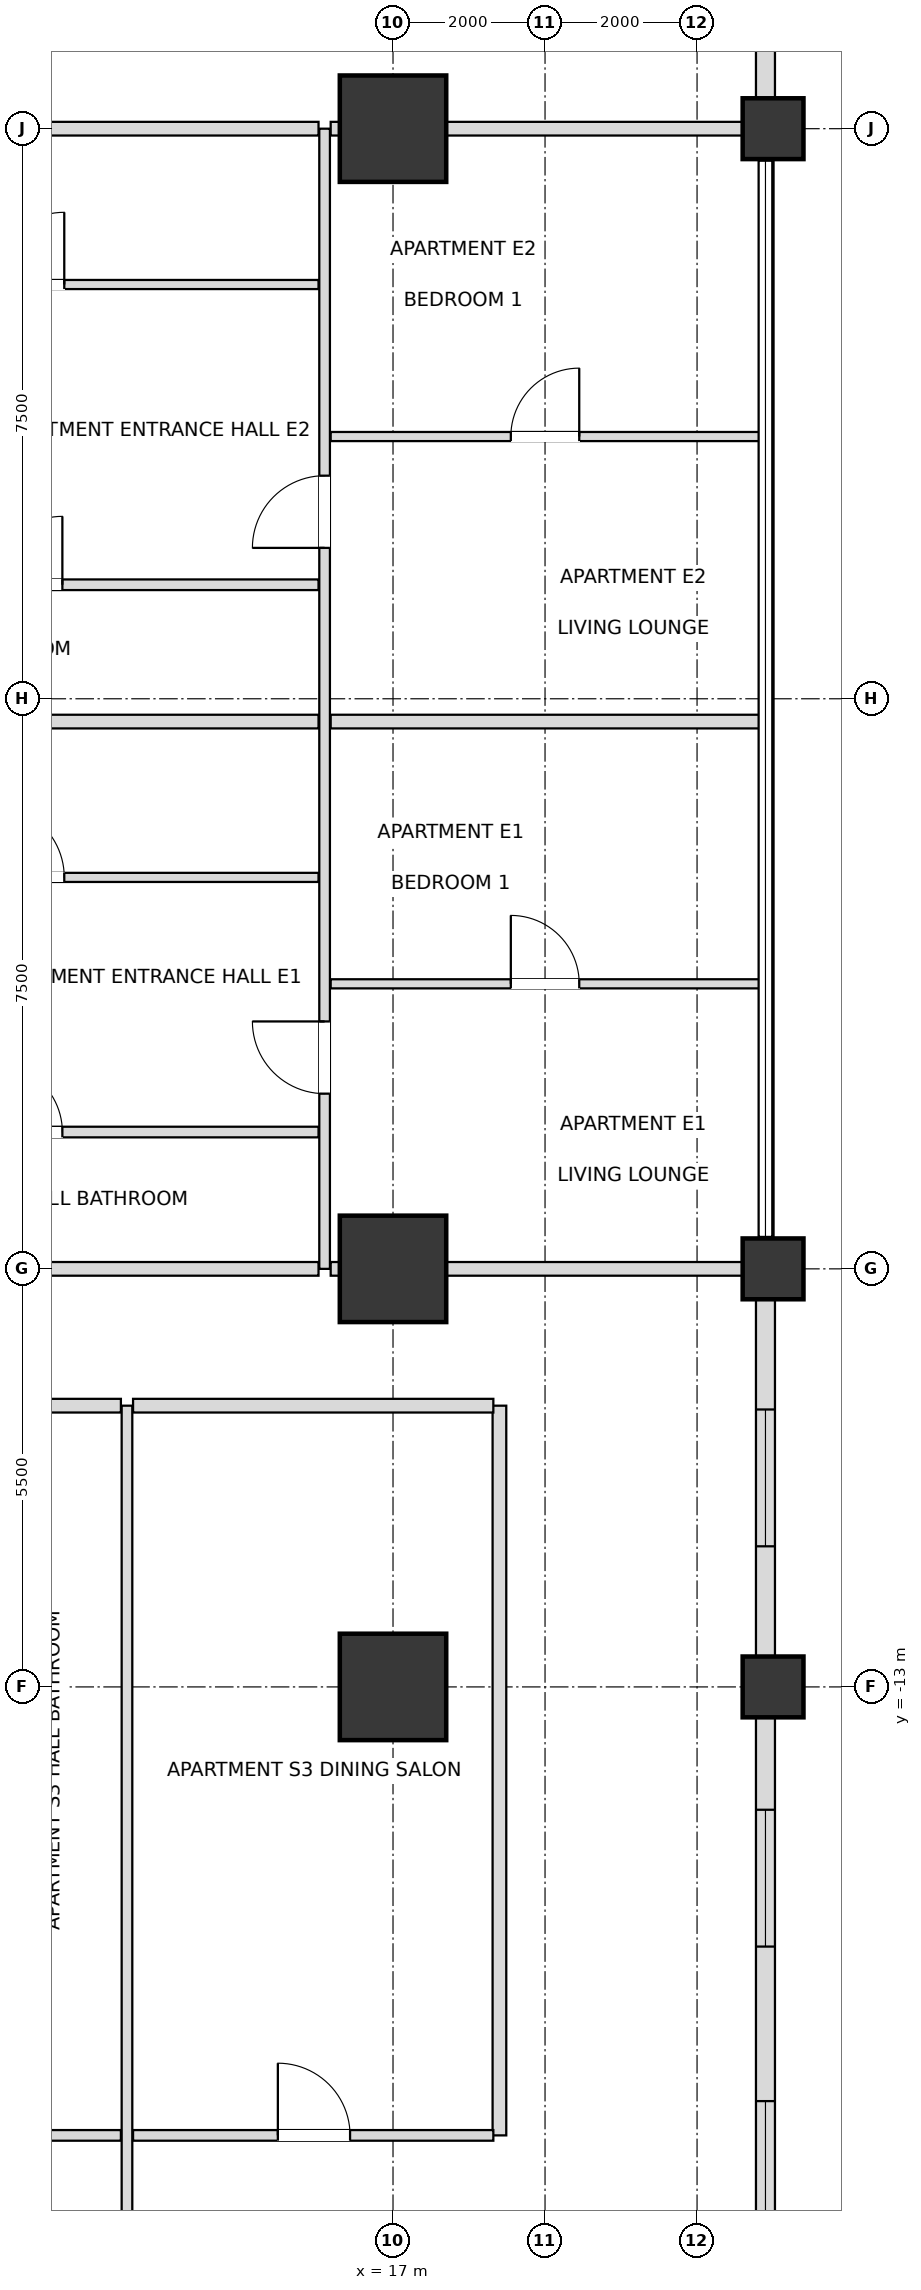
"""IFC4 building model, lengths in metres.
Left out: names, types, materials, properties, quantities, classifications, styles, units other than length and angle.
Written with IfcOpenShell. Run it as: python <this file> out.ifc"""

import sys

from ifc_helpers import new_model, si_unit, direction, frame, frame_2d, origin, origin_2d, place, context, subcontext, project, spatial, rectangle, extrude, element, fill, save


model = new_model("IFC4")
c1 = context("Model", 3, precision=1e-05, world=origin(), true_north=direction((0.0, 1.0)))
c2 = subcontext(c1, "Body", "Model", "MODEL_VIEW")
j1 = project(units=[si_unit("LENGTHUNIT", "METRE"), si_unit("PLANEANGLEUNIT", "RADIAN")], contexts=[c1])
p1 = place(None, origin())
s1 = spatial("IfcSite", under=j1, at=p1, CompositionType="ELEMENT")
p2 = place(p1, origin())
s2 = spatial("IfcBuilding", under=s1, at=p2, CompositionType="ELEMENT")
p3 = place(p2, frame((0.0, 0.0, 32.4)))
s3 = spatial("IfcBuildingStorey", under=s2, at=p3, CompositionType="ELEMENT", Elevation=32.4)
for number, where, z_axis, x_axis in (
    (1, (17.0, -13.0, 0.0), (0.0, 0.0, 1.0), (1.0, 0.0, 0.0)),
    (2, (17.0, -7.5, 0.0), (0.0, 0.0, 1.0), (1.0, 0.0, 0.0)),
    (3, (17.0, 7.5, 0.0), (0.0, 0.0, 1.0), (1.0, 0.0, 0.0)),
):
    element("IfcColumn", number, at=place(p3, frame(where, z_axis=z_axis, x_axis=x_axis)), inside=s3, PredefinedType="USERDEFINED", context=c2, shape_type="SweptSolid", body=[
        extrude(rectangle(XDim=1.4, YDim=1.4, at=origin_2d()), origin(), (0.0, 0.0, 1.0), 3.6),
    ])
for number, where, z_axis, x_axis in (
    (4, (22.0, -13.0, 0.0), (0.0, 0.0, 1.0), (1.0, 0.0, 0.0)),
    (5, (22.0, -7.5, 0.0), (0.0, 0.0, 1.0), (1.0, 0.0, 0.0)),
    (6, (22.0, 7.5, 0.0), (0.0, 0.0, 1.0), (1.0, 0.0, 0.0)),
):
    element("IfcColumn", number, at=place(p3, frame(where, z_axis=z_axis, x_axis=x_axis)), inside=s3, PredefinedType="COLUMN", context=c2, shape_type="SweptSolid", body=[
        extrude(rectangle(XDim=0.8, YDim=0.8, at=origin_2d()), origin(), (0.0, 0.0, 1.0), 3.6),
    ])
p4 = place(p3, frame((21.9, -21.425, 0.0), z_axis=(0.0, 0.0, 1.0), x_axis=(0.0, 1.0, 0.0)))
e7 = element("IfcWall", 7, at=p4, inside=s3, PredefinedType="SOLIDWALL", context=c2, shape_type="SweptSolid", body=[
    extrude(rectangle(XDim=8.03, YDim=0.25, at=frame_2d((4.015, 0.0))), origin(), (0.0, 0.0, 1.0), 2.736),
])
p5 = place(p4, frame((1.176, 0.0, 0.72)))
e8 = element("IfcOpeningElement", 8, at=p5, cuts=e7, PredefinedType="OPENING", context=c2, shape_type="SweptSolid", body=[
    extrude(rectangle(XDim=1.8, YDim=1.68, at=frame_2d((0.9, 0.84))), frame((0.0, 0.135, 0.0), z_axis=(0.0, -1.0, 0.0), x_axis=(1.0, 0.0, 0.0)), (0.0, 0.0, 1.0), 0.27),
])
p6 = place(p4, frame((5.009, 0.0, 0.72)))
e9 = element("IfcOpeningElement", 9, at=p6, cuts=e7, PredefinedType="OPENING", context=c2, shape_type="SweptSolid", body=[
    extrude(rectangle(XDim=1.8, YDim=1.68, at=frame_2d((0.9, 0.84))), frame((0.0, 0.135, 0.0), z_axis=(0.0, -1.0, 0.0), x_axis=(1.0, 0.0, 0.0)), (0.0, 0.0, 1.0), 0.27),
])
p7 = place(p3, frame((21.9, -12.605, 0.0), z_axis=(0.0, 0.0, 1.0), x_axis=(0.0, 1.0, 0.0)))
e10 = element("IfcWall", 10, at=p7, inside=s3, PredefinedType="SOLIDWALL", context=c2, shape_type="SweptSolid", body=[
    extrude(rectangle(XDim=4.71, YDim=0.25, at=frame_2d((2.355, 0.0))), origin(), (0.0, 0.0, 1.0), 2.736),
])
p8 = place(p7, frame((1.455, 0.0, 0.72)))
e11 = element("IfcOpeningElement", 11, at=p8, cuts=e10, PredefinedType="OPENING", context=c2, shape_type="SweptSolid", body=[
    extrude(rectangle(XDim=1.8, YDim=1.68, at=frame_2d((0.9, 0.84))), frame((0.0, 0.135, 0.0), z_axis=(0.0, -1.0, 0.0), x_axis=(1.0, 0.0, 0.0)), (0.0, 0.0, 1.0), 0.27),
])
p9 = place(p3, frame((21.9, 7.895, 0.0), z_axis=(0.0, 0.0, 1.0), x_axis=(0.0, 1.0, 0.0)))
e12 = element("IfcWall", 12, at=p9, inside=s3, PredefinedType="SOLIDWALL", context=c2, shape_type="SweptSolid", body=[
    extrude(rectangle(XDim=4.71, YDim=0.25, at=frame_2d((2.355, 0.0))), origin(), (0.0, 0.0, 1.0), 2.736),
])
p10 = place(p9, frame((1.455, 0.0, 0.72)))
e13 = element("IfcOpeningElement", 13, at=p10, cuts=e12, PredefinedType="OPENING", context=c2, shape_type="SweptSolid", body=[
    extrude(rectangle(XDim=1.8, YDim=1.68, at=frame_2d((0.9, 0.84))), frame((0.0, 0.135, 0.0), z_axis=(0.0, -1.0, 0.0), x_axis=(1.0, 0.0, 0.0)), (0.0, 0.0, 1.0), 0.27),
])
p11 = place(p3, frame((13.5, -24.9, 0.0), z_axis=(0.0, 0.0, 1.0), x_axis=(0.0, 1.0, 0.0)))
e14 = element("IfcWall", 14, at=p11, inside=s3, PredefinedType="PARTITIONING", context=c2, shape_type="SweptSolid", body=[
    extrude(rectangle(XDim=15.6, YDim=0.14, at=frame_2d((7.8, 0.0))), origin(), (0.0, 0.0, 1.0), 2.736),
])
p12 = place(p11, frame((2.55, 0.0, 0.0)))
e15 = element("IfcOpeningElement", 15, at=p12, cuts=e14, PredefinedType="OPENING", context=c2, shape_type="SweptSolid", body=[
    extrude(rectangle(XDim=0.9, YDim=2.1, at=frame_2d((0.45, 1.05))), frame((0.0, 0.08, 0.0), z_axis=(0.0, -1.0, 0.0), x_axis=(1.0, 0.0, 0.0)), (0.0, 0.0, 1.0), 0.16),
])
p13 = place(p3, frame((16.1, -7.5, 0.0), z_axis=(0.0, 0.0, 1.0), x_axis=(0.0, 1.0, 0.0)))
e16 = element("IfcWall", 16, at=p13, inside=s3, PredefinedType="PARTITIONING", context=c2, shape_type="SweptSolid", body=[
    extrude(rectangle(XDim=15.0, YDim=0.14, at=frame_2d((7.5, 0.0))), origin(), (0.0, 0.0, 1.0), 3.38),
])
p14 = place(p13, frame((2.305, 0.0, 0.0)))
e17 = element("IfcOpeningElement", 17, at=p14, cuts=e16, PredefinedType="OPENING", context=c2, shape_type="SweptSolid", body=[
    extrude(rectangle(XDim=0.95, YDim=2.1, at=frame_2d((0.475, 1.05))), frame((0.0, 0.08, 0.0), z_axis=(0.0, -1.0, 0.0), x_axis=(1.0, 0.0, 0.0)), (0.0, 0.0, 1.0), 0.16),
])
p15 = place(p13, frame((9.485, 0.0, 0.0)))
e18 = element("IfcOpeningElement", 18, at=p15, cuts=e16, PredefinedType="OPENING", context=c2, shape_type="SweptSolid", body=[
    extrude(rectangle(XDim=0.95, YDim=2.1, at=frame_2d((0.475, 1.05))), frame((0.0, 0.08, 0.0), z_axis=(0.0, -1.0, 0.0), x_axis=(1.0, 0.0, 0.0)), (0.0, 0.0, 1.0), 0.16),
])
p16 = place(p3, frame((18.4, -18.9, 0.0), z_axis=(0.0, 0.0, 1.0), x_axis=(0.0, 1.0, 0.0)))
e19 = element("IfcWall", 19, at=p16, inside=s3, PredefinedType="PARTITIONING", context=c2, shape_type="SweptSolid", body=[
    extrude(rectangle(XDim=9.6, YDim=0.18, at=frame_2d((4.8, 0.0))), origin(), (0.0, 0.0, 1.0), 2.736),
])
p17 = place(p3, frame((11.63, -18.9, 0.0), z_axis=(0.0, 0.0, 1.0), x_axis=(1.0, 0.0, 0.0)))
e20 = element("IfcWall", 20, at=p17, inside=s3, PredefinedType="PARTITIONING", context=c2, shape_type="SweptSolid", body=[
    extrude(rectangle(XDim=1.79, YDim=0.14, at=frame_2d((0.895, 0.0))), origin(), (0.0, 0.0, 1.0), 2.736),
])
p18 = place(p3, frame((13.58, -18.9, 0.0), z_axis=(0.0, 0.0, 1.0), x_axis=(1.0, 0.0, 0.0)))
e21 = element("IfcWall", 21, at=p18, inside=s3, PredefinedType="PARTITIONING", context=c2, shape_type="SweptSolid", body=[
    extrude(rectangle(XDim=4.74, YDim=0.14, at=frame_2d((2.37, 0.0))), origin(), (0.0, 0.0, 1.0), 2.736),
])
p19 = place(p18, frame((1.905, 0.0, 0.0)))
e22 = element("IfcOpeningElement", 22, at=p19, cuts=e21, PredefinedType="OPENING", context=c2, shape_type="SweptSolid", body=[
    extrude(rectangle(XDim=0.95, YDim=2.1, at=frame_2d((0.475, 1.05))), frame((0.0, 0.08, 0.0), z_axis=(0.0, -1.0, 0.0), x_axis=(1.0, 0.0, 0.0)), (0.0, 0.0, 1.0), 0.16),
])
p20 = place(p3, frame((11.63, -9.3, 0.0), z_axis=(0.0, 0.0, 1.0), x_axis=(1.0, 0.0, 0.0)))
e23 = element("IfcWall", 23, at=p20, inside=s3, PredefinedType="PARTITIONING", context=c2, shape_type="SweptSolid", body=[
    extrude(rectangle(XDim=1.79, YDim=0.18, at=frame_2d((0.895, 0.0))), origin(), (0.0, 0.0, 1.0), 3.38),
])
p21 = place(p3, frame((13.58, -9.3, 0.0), z_axis=(0.0, 0.0, 1.0), x_axis=(1.0, 0.0, 0.0)))
e24 = element("IfcWall", 24, at=p21, inside=s3, PredefinedType="PARTITIONING", context=c2, shape_type="SweptSolid", body=[
    extrude(rectangle(XDim=4.74, YDim=0.18, at=frame_2d((2.37, 0.0))), origin(), (0.0, 0.0, 1.0), 2.816),
])
p22 = place(p3, frame((8.38, -7.5, 0.0), z_axis=(0.0, 0.0, 1.0), x_axis=(1.0, 0.0, 0.0)))
e25 = element("IfcWall", 25, at=p22, inside=s3, PredefinedType="PARTITIONING", context=c2, shape_type="SweptSolid", body=[
    extrude(rectangle(XDim=7.64, YDim=0.18, at=frame_2d((3.82, 0.0))), origin(), (0.0, 0.0, 1.0), 2.816),
])
p23 = place(p3, frame((16.18, -7.5, 0.0), z_axis=(0.0, 0.0, 1.0), x_axis=(1.0, 0.0, 0.0)))
e26 = element("IfcWall", 26, at=p23, inside=s3, PredefinedType="PARTITIONING", context=c2, shape_type="SweptSolid", body=[
    extrude(rectangle(XDim=5.72, YDim=0.18, at=frame_2d((2.86, 0.0))), origin(), (0.0, 0.0, 1.0), 2.816),
])
p24 = place(p3, frame((8.38, -5.7, 0.0), z_axis=(0.0, 0.0, 1.0), x_axis=(1.0, 0.0, 0.0)))
e27 = element("IfcWall", 27, at=p24, inside=s3, PredefinedType="PARTITIONING", context=c2, shape_type="SweptSolid", body=[
    extrude(rectangle(XDim=7.64, YDim=0.14, at=frame_2d((3.82, 0.0))), origin(), (0.0, 0.0, 1.0), 2.948),
])
p25 = place(p24, frame((3.37, 0.0, 0.0)))
e28 = element("IfcOpeningElement", 28, at=p25, cuts=e27, PredefinedType="OPENING", context=c2, shape_type="SweptSolid", body=[
    extrude(rectangle(XDim=0.9, YDim=2.1, at=frame_2d((0.45, 1.05))), frame((0.0, 0.08, 0.0), z_axis=(0.0, -1.0, 0.0), x_axis=(1.0, 0.0, 0.0)), (0.0, 0.0, 1.0), 0.16),
])
p26 = place(p3, frame((16.18, -3.75, 0.0), z_axis=(0.0, 0.0, 1.0), x_axis=(1.0, 0.0, 0.0)))
e29 = element("IfcWall", 29, at=p26, inside=s3, PredefinedType="PARTITIONING", context=c2, shape_type="SweptSolid", body=[
    extrude(rectangle(XDim=5.64, YDim=0.12, at=frame_2d((2.82, 0.0))), origin(), (0.0, 0.0, 1.0), 2.816),
])
p27 = place(p26, frame((2.37, 0.0, 0.0)))
e30 = element("IfcOpeningElement", 30, at=p27, cuts=e29, PredefinedType="OPENING", context=c2, shape_type="SweptSolid", body=[
    extrude(rectangle(XDim=0.9, YDim=2.1, at=frame_2d((0.45, 1.05))), frame((0.0, 0.07, 0.0), z_axis=(0.0, -1.0, 0.0), x_axis=(1.0, 0.0, 0.0)), (0.0, 0.0, 1.0), 0.14),
])
p28 = place(p3, frame((8.38, -2.35, 0.0), z_axis=(0.0, 0.0, 1.0), x_axis=(1.0, 0.0, 0.0)))
e31 = element("IfcWall", 31, at=p28, inside=s3, PredefinedType="PARTITIONING", context=c2, shape_type="SweptSolid", body=[
    extrude(rectangle(XDim=7.64, YDim=0.12, at=frame_2d((3.82, 0.0))), origin(), (0.0, 0.0, 1.0), 2.948),
])
p29 = place(p28, frame((3.345, 0.0, 0.0)))
e32 = element("IfcOpeningElement", 32, at=p29, cuts=e31, PredefinedType="OPENING", context=c2, shape_type="SweptSolid", body=[
    extrude(rectangle(XDim=0.95, YDim=2.1, at=frame_2d((0.475, 1.05))), frame((0.0, 0.07, 0.0), z_axis=(0.0, -1.0, 0.0), x_axis=(1.0, 0.0, 0.0)), (0.0, 0.0, 1.0), 0.14),
])
p30 = place(p3, frame((8.38, -0.3, 0.0), z_axis=(0.0, 0.0, 1.0), x_axis=(1.0, 0.0, 0.0)))
e33 = element("IfcWall", 33, at=p30, inside=s3, PredefinedType="PARTITIONING", context=c2, shape_type="SweptSolid", body=[
    extrude(rectangle(XDim=7.64, YDim=0.18, at=frame_2d((3.82, 0.0))), origin(), (0.0, 0.0, 1.0), 2.948),
])
p31 = place(p3, frame((16.18, -0.3, 0.0), z_axis=(0.0, 0.0, 1.0), x_axis=(1.0, 0.0, 0.0)))
e34 = element("IfcWall", 34, at=p31, inside=s3, PredefinedType="PARTITIONING", context=c2, shape_type="SweptSolid", body=[
    extrude(rectangle(XDim=5.64, YDim=0.18, at=frame_2d((2.82, 0.0))), origin(), (0.0, 0.0, 1.0), 2.816),
])
p32 = place(p3, frame((8.38, 1.5, 0.0), z_axis=(0.0, 0.0, 1.0), x_axis=(1.0, 0.0, 0.0)))
e35 = element("IfcWall", 35, at=p32, inside=s3, PredefinedType="PARTITIONING", context=c2, shape_type="SweptSolid", body=[
    extrude(rectangle(XDim=7.64, YDim=0.14, at=frame_2d((3.82, 0.0))), origin(), (0.0, 0.0, 1.0), 2.948),
])
p33 = place(p32, frame((3.37, 0.0, 0.0)))
e36 = element("IfcOpeningElement", 36, at=p33, cuts=e35, PredefinedType="OPENING", context=c2, shape_type="SweptSolid", body=[
    extrude(rectangle(XDim=0.9, YDim=2.1, at=frame_2d((0.45, 1.05))), frame((0.0, 0.08, 0.0), z_axis=(0.0, -1.0, 0.0), x_axis=(1.0, 0.0, 0.0)), (0.0, 0.0, 1.0), 0.16),
])
p34 = place(p3, frame((16.18, 3.45, 0.0), z_axis=(0.0, 0.0, 1.0), x_axis=(1.0, 0.0, 0.0)))
e37 = element("IfcWall", 37, at=p34, inside=s3, PredefinedType="PARTITIONING", context=c2, shape_type="SweptSolid", body=[
    extrude(rectangle(XDim=5.64, YDim=0.12, at=frame_2d((2.82, 0.0))), origin(), (0.0, 0.0, 1.0), 2.816),
])
p35 = place(p34, frame((2.37, 0.0, 0.0)))
e38 = element("IfcOpeningElement", 38, at=p35, cuts=e37, PredefinedType="OPENING", context=c2, shape_type="SweptSolid", body=[
    extrude(rectangle(XDim=0.9, YDim=2.1, at=frame_2d((0.45, 1.05))), frame((0.0, 0.07, 0.0), z_axis=(0.0, -1.0, 0.0), x_axis=(1.0, 0.0, 0.0)), (0.0, 0.0, 1.0), 0.14),
])
p36 = place(p3, frame((8.38, 5.45, 0.0), z_axis=(0.0, 0.0, 1.0), x_axis=(1.0, 0.0, 0.0)))
e39 = element("IfcWall", 39, at=p36, inside=s3, PredefinedType="PARTITIONING", context=c2, shape_type="SweptSolid", body=[
    extrude(rectangle(XDim=7.64, YDim=0.12, at=frame_2d((3.82, 0.0))), origin(), (0.0, 0.0, 1.0), 2.948),
])
p37 = place(p36, frame((3.345, 0.0, 0.0)))
e40 = element("IfcOpeningElement", 40, at=p37, cuts=e39, PredefinedType="OPENING", context=c2, shape_type="SweptSolid", body=[
    extrude(rectangle(XDim=0.95, YDim=2.1, at=frame_2d((0.475, 1.05))), frame((0.0, 0.07, 0.0), z_axis=(0.0, -1.0, 0.0), x_axis=(1.0, 0.0, 0.0)), (0.0, 0.0, 1.0), 0.14),
])
p38 = place(p3, frame((8.38, 7.5, 0.0), z_axis=(0.0, 0.0, 1.0), x_axis=(1.0, 0.0, 0.0)))
e41 = element("IfcWall", 41, at=p38, inside=s3, PredefinedType="PARTITIONING", context=c2, shape_type="SweptSolid", body=[
    extrude(rectangle(XDim=7.64, YDim=0.18, at=frame_2d((3.82, 0.0))), origin(), (0.0, 0.0, 1.0), 2.816),
])
p39 = place(p3, frame((16.18, 7.5, 0.0), z_axis=(0.0, 0.0, 1.0), x_axis=(1.0, 0.0, 0.0)))
e42 = element("IfcWall", 42, at=p39, inside=s3, PredefinedType="PARTITIONING", context=c2, shape_type="SweptSolid", body=[
    extrude(rectangle(XDim=5.72, YDim=0.18, at=frame_2d((2.86, 0.0))), origin(), (0.0, 0.0, 1.0), 2.816),
])
p40 = place(p5, origin())
e43 = element("IfcWindow", 43, at=p40, inside=s3, PartitioningType="SINGLE_PANEL", PredefinedType="WINDOW", context=c2, shape_type="SweptSolid", body=[
    extrude(rectangle(XDim=1.8, YDim=1.68, at=frame_2d((0.9, 0.84))), frame((0.0, 0.03, 0.0), z_axis=(0.0, -1.0, 0.0), x_axis=(1.0, 0.0, 0.0)), (0.0, 0.0, 1.0), 0.06),
])
fill(e8, e43)
p41 = place(p6, origin())
e44 = element("IfcWindow", 44, at=p41, inside=s3, PartitioningType="SINGLE_PANEL", PredefinedType="WINDOW", context=c2, shape_type="SweptSolid", body=[
    extrude(rectangle(XDim=1.8, YDim=1.68, at=frame_2d((0.9, 0.84))), frame((0.0, 0.03, 0.0), z_axis=(0.0, -1.0, 0.0), x_axis=(1.0, 0.0, 0.0)), (0.0, 0.0, 1.0), 0.06),
])
fill(e9, e44)
p42 = place(p8, origin())
e45 = element("IfcWindow", 45, at=p42, inside=s3, PartitioningType="SINGLE_PANEL", PredefinedType="WINDOW", context=c2, shape_type="SweptSolid", body=[
    extrude(rectangle(XDim=1.8, YDim=1.68, at=frame_2d((0.9, 0.84))), frame((0.0, 0.03, 0.0), z_axis=(0.0, -1.0, 0.0), x_axis=(1.0, 0.0, 0.0)), (0.0, 0.0, 1.0), 0.06),
])
fill(e11, e45)
p43 = place(p19, origin())
e46 = element("IfcDoor", 46, at=p43, inside=s3, OperationType="SINGLE_SWING_LEFT", PredefinedType="DOOR", context=c2, shape_type="SweptSolid", body=[
    extrude(rectangle(XDim=0.95, YDim=2.1, at=frame_2d((0.475, 1.05))), frame((0.0, 0.025, 0.0), z_axis=(0.0, -1.0, 0.0), x_axis=(1.0, 0.0, 0.0)), (0.0, 0.0, 1.0), 0.05),
])
fill(e22, e46)
p44 = place(p25, origin())
e47 = element("IfcDoor", 47, at=p44, inside=s3, OperationType="SINGLE_SWING_LEFT", PredefinedType="DOOR", context=c2, shape_type="SweptSolid", body=[
    extrude(rectangle(XDim=0.9, YDim=2.1, at=frame_2d((0.45, 1.05))), frame((0.0, 0.025, 0.0), z_axis=(0.0, -1.0, 0.0), x_axis=(1.0, 0.0, 0.0)), (0.0, 0.0, 1.0), 0.05),
])
fill(e28, e47)
p45 = place(p29, origin())
e48 = element("IfcDoor", 48, at=p45, inside=s3, OperationType="SINGLE_SWING_LEFT", PredefinedType="DOOR", context=c2, shape_type="SweptSolid", body=[
    extrude(rectangle(XDim=0.95, YDim=2.1, at=frame_2d((0.475, 1.05))), frame((0.0, 0.025, 0.0), z_axis=(0.0, -1.0, 0.0), x_axis=(1.0, 0.0, 0.0)), (0.0, 0.0, 1.0), 0.05),
])
fill(e32, e48)
p46 = place(p14, origin())
e49 = element("IfcDoor", 49, at=p46, inside=s3, OperationType="SINGLE_SWING_RIGHT", PredefinedType="DOOR", context=c2, shape_type="SweptSolid", body=[
    extrude(rectangle(XDim=0.95, YDim=2.1, at=frame_2d((0.475, 1.05))), frame((0.0, 0.025, 0.0), z_axis=(0.0, -1.0, 0.0), x_axis=(1.0, 0.0, 0.0)), (0.0, 0.0, 1.0), 0.05),
])
fill(e17, e49)
p47 = place(p27, origin())
e50 = element("IfcDoor", 50, at=p47, inside=s3, OperationType="SINGLE_SWING_LEFT", PredefinedType="DOOR", context=c2, shape_type="SweptSolid", body=[
    extrude(rectangle(XDim=0.9, YDim=2.1, at=frame_2d((0.45, 1.05))), frame((0.0, 0.025, 0.0), z_axis=(0.0, -1.0, 0.0), x_axis=(1.0, 0.0, 0.0)), (0.0, 0.0, 1.0), 0.05),
])
fill(e30, e50)
p48 = place(p33, origin())
e51 = element("IfcDoor", 51, at=p48, inside=s3, OperationType="SINGLE_SWING_RIGHT", PredefinedType="DOOR", context=c2, shape_type="SweptSolid", body=[
    extrude(rectangle(XDim=0.9, YDim=2.1, at=frame_2d((0.45, 1.05))), frame((0.0, 0.025, 0.0), z_axis=(0.0, -1.0, 0.0), x_axis=(1.0, 0.0, 0.0)), (0.0, 0.0, 1.0), 0.05),
])
fill(e36, e51)
p49 = place(p37, origin())
e52 = element("IfcDoor", 52, at=p49, inside=s3, OperationType="SINGLE_SWING_RIGHT", PredefinedType="DOOR", context=c2, shape_type="SweptSolid", body=[
    extrude(rectangle(XDim=0.95, YDim=2.1, at=frame_2d((0.475, 1.05))), frame((0.0, 0.025, 0.0), z_axis=(0.0, -1.0, 0.0), x_axis=(1.0, 0.0, 0.0)), (0.0, 0.0, 1.0), 0.05),
])
fill(e40, e52)
p50 = place(p15, origin())
e53 = element("IfcDoor", 53, at=p50, inside=s3, OperationType="SINGLE_SWING_LEFT", PredefinedType="DOOR", context=c2, shape_type="SweptSolid", body=[
    extrude(rectangle(XDim=0.95, YDim=2.1, at=frame_2d((0.475, 1.05))), frame((0.0, 0.025, 0.0), z_axis=(0.0, -1.0, 0.0), x_axis=(1.0, 0.0, 0.0)), (0.0, 0.0, 1.0), 0.05),
])
fill(e18, e53)
p51 = place(p35, origin())
e54 = element("IfcDoor", 54, at=p51, inside=s3, OperationType="SINGLE_SWING_RIGHT", PredefinedType="DOOR", context=c2, shape_type="SweptSolid", body=[
    extrude(rectangle(XDim=0.9, YDim=2.1, at=frame_2d((0.45, 1.05))), frame((0.0, 0.025, 0.0), z_axis=(0.0, -1.0, 0.0), x_axis=(1.0, 0.0, 0.0)), (0.0, 0.0, 1.0), 0.05),
])
fill(e38, e54)
save(model, sys.argv[1])
